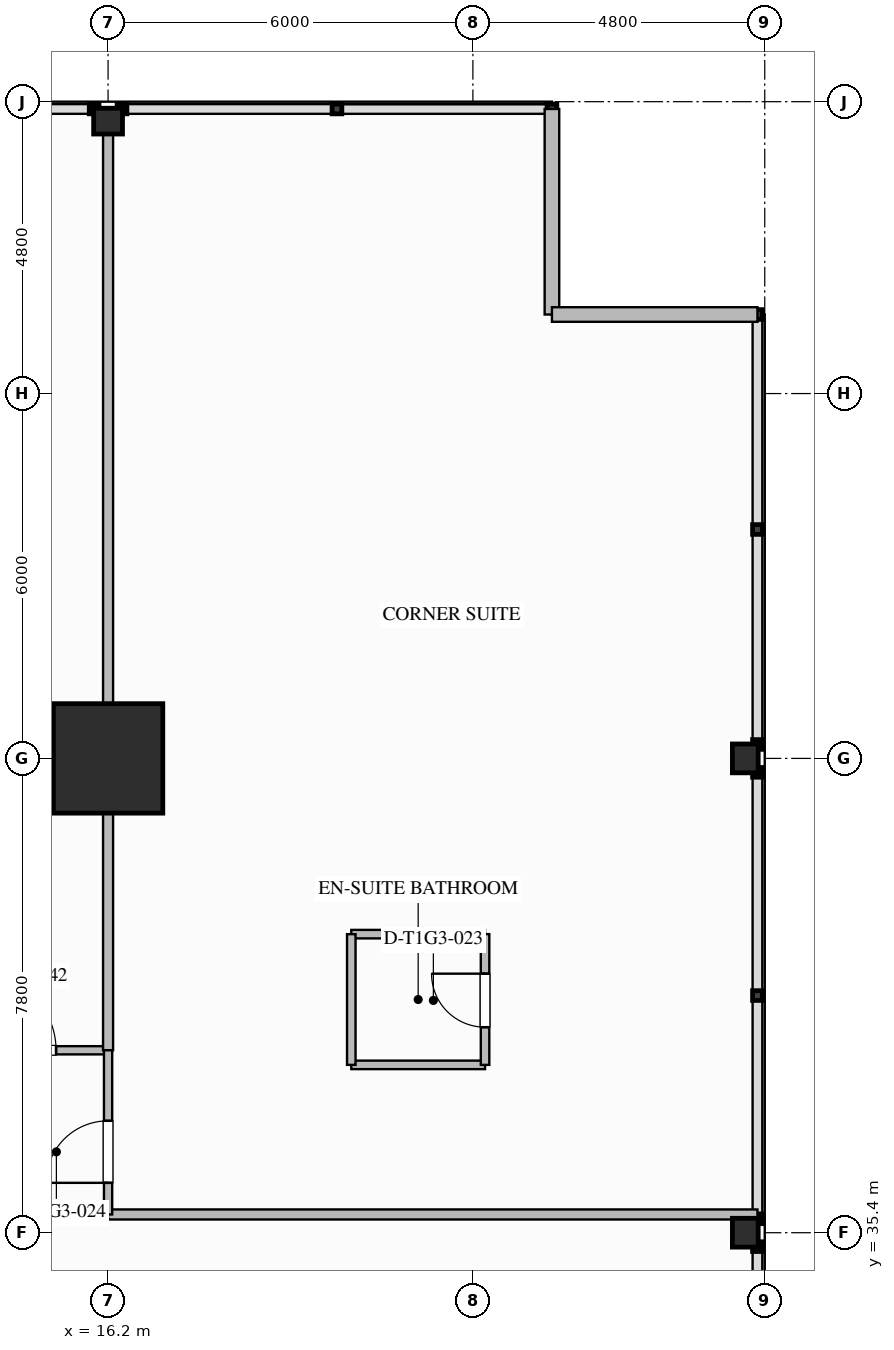
"""IFC4 building model, lengths in metres.
Left out: names, types, materials, properties, quantities, classifications, styles, units other than length and angle.
Written with IfcOpenShell. Run it as: python <this file> out.ifc"""

import sys

from ifc_helpers import new_model, si_unit, direction, frame, frame_2d, origin, origin_2d, place, context, subcontext, project, spatial, rectangle, i_section, extrude, element, fill, save


model = new_model("IFC4")
c1 = context("Model", 3, precision=1e-05, world=origin(), true_north=direction((0.0, 1.0)))
c2 = subcontext(c1, "Body", "Model", "MODEL_VIEW")
j1 = project(units=[si_unit("LENGTHUNIT", "METRE"), si_unit("PLANEANGLEUNIT", "RADIAN")], contexts=[c1])
p1 = place(None, origin())
s1 = spatial("IfcSite", under=j1, at=p1, CompositionType="ELEMENT")
p2 = place(p1, origin())
s2 = spatial("IfcBuilding", under=s1, at=p2, CompositionType="ELEMENT")
p3 = place(p2, frame((0.0, 0.0, 61.2)))
s3 = spatial("IfcBuildingStorey", under=s2, at=p3, CompositionType="ELEMENT", Elevation=61.2)
p4 = place(p3, frame((16.2, 43.2, 0.0), z_axis=(0.0, 0.0, 1.0), x_axis=(1.0, 0.0, 0.0)))
e1 = element("IfcColumn", 1, at=p4, inside=s3, PredefinedType="COLUMN", context=c2, shape_type="SweptSolid", body=[
    extrude(rectangle(XDim=1.8, YDim=1.8, at=origin_2d()), origin(), (0.0, 0.0, 1.0), 3.5),
])
for number, where, z_axis, x_axis in (
    (2, (26.68, 35.4, 0.0), (0.0, 0.0, 1.0), (1.0, 0.0, 0.0)),
    (3, (26.68, 43.2, 0.0), (0.0, 0.0, 1.0), (1.0, 0.0, 0.0)),
    (4, (16.2, 53.68, 0.0), (0.0, 0.0, 1.0), (0.0, 1.0, 0.0)),
):
    element("IfcColumn", number, at=place(p3, frame(where, z_axis=z_axis, x_axis=x_axis)), inside=s3, PredefinedType="COLUMN", context=c2, shape_type="SweptSolid", body=[
        extrude(i_section(OverallWidth=0.424, OverallDepth=0.474, WebThickness=0.048, FlangeThickness=0.077, FilletRadius=0.03, at=origin_2d()), origin(), (0.0, 0.0, 1.0), 3.497),
    ])
for number, where, z_axis, x_axis in (
    (5, (23.5, 53.88, 0.0), (0.0, 0.0, 1.0), (0.0, -1.0, 0.0)),
    (6, (23.5, 50.5, 0.0), (0.0, 0.0, 1.0), (1.0, 0.0, 0.0)),
):
    element("IfcWall", number, at=place(p3, frame(where, z_axis=z_axis, x_axis=x_axis)), inside=s3, PredefinedType="STANDARD", context=c2, shape_type="SweptSolid", body=[
        extrude(rectangle(XDim=3.38, YDim=0.24, at=frame_2d((1.69, 0.0))), origin(), (0.0, 0.0, 1.0), 3.24),
    ])
p5 = place(p3, frame((-16.2, 38.4, 0.0), z_axis=(0.0, 0.0, 1.0), x_axis=(1.0, 0.0, 0.0)))
e7 = element("IfcWall", 7, at=p5, inside=s3, PredefinedType="PARTITIONING", context=c2, shape_type="SweptSolid", body=[
    extrude(rectangle(XDim=32.4, YDim=0.135, at=frame_2d((16.2, 0.0))), origin(), (0.0, 0.0, 1.0), 3.24),
])
p6 = place(p5, frame((4.095, 0.0, 0.0)))
e8 = element("IfcOpeningElement", 8, at=p6, cuts=e7, PredefinedType="OPENING", context=c2, shape_type="SweptSolid", body=[
    extrude(rectangle(XDim=1.26, YDim=2.2, at=frame_2d((0.63, 1.1))), frame((0.0, 0.077, 0.0), z_axis=(0.0, -1.0, 0.0), x_axis=(1.0, 0.0, 0.0)), (0.0, 0.0, 1.0), 0.155),
])
p7 = place(p5, frame((7.875, 0.0, 0.0)))
e9 = element("IfcOpeningElement", 9, at=p7, cuts=e7, PredefinedType="OPENING", context=c2, shape_type="SweptSolid", body=[
    extrude(rectangle(XDim=1.26, YDim=2.2, at=frame_2d((0.63, 1.1))), frame((0.0, 0.077, 0.0), z_axis=(0.0, -1.0, 0.0), x_axis=(1.0, 0.0, 0.0)), (0.0, 0.0, 1.0), 0.155),
])
p8 = place(p5, frame((15.69, 0.0, 0.0)))
e10 = element("IfcOpeningElement", 10, at=p8, cuts=e7, PredefinedType="OPENING", context=c2, shape_type="SweptSolid", body=[
    extrude(rectangle(XDim=1.02, YDim=2.15, at=frame_2d((0.51, 1.075))), frame((0.0, 0.077, 0.0), z_axis=(0.0, -1.0, 0.0), x_axis=(1.0, 0.0, 0.0)), (0.0, 0.0, 1.0), 0.155),
])
p9 = place(p5, frame((21.645, 0.0, 0.0)))
e11 = element("IfcOpeningElement", 11, at=p9, cuts=e7, PredefinedType="OPENING", context=c2, shape_type="SweptSolid", body=[
    extrude(rectangle(XDim=1.26, YDim=2.2, at=frame_2d((0.63, 1.1))), frame((0.0, 0.077, 0.0), z_axis=(0.0, -1.0, 0.0), x_axis=(1.0, 0.0, 0.0)), (0.0, 0.0, 1.0), 0.155),
])
p10 = place(p5, frame((30.285, 0.0, 0.0)))
e12 = element("IfcOpeningElement", 12, at=p10, cuts=e7, PredefinedType="OPENING", context=c2, shape_type="SweptSolid", body=[
    extrude(rectangle(XDim=1.26, YDim=2.2, at=frame_2d((0.63, 1.1))), frame((0.0, 0.077, 0.0), z_axis=(0.0, -1.0, 0.0), x_axis=(1.0, 0.0, 0.0)), (0.0, 0.0, 1.0), 0.155),
])
p11 = place(p3, frame((11.35, 35.7, 0.0), z_axis=(0.0, 0.0, 1.0), x_axis=(1.0, 0.0, 0.0)))
e13 = element("IfcWall", 13, at=p11, inside=s3, PredefinedType="PARTITIONING", context=c2, shape_type="SweptSolid", body=[
    extrude(rectangle(XDim=4.85, YDim=0.135, at=frame_2d((2.425, 0.0))), origin(), (0.0, 0.0, 1.0), 3.24),
])
p12 = place(p3, frame((16.2, 38.4, 0.0), z_axis=(0.0, 0.0, 1.0), x_axis=(0.0, 1.0, 0.0)))
e14 = element("IfcWall", 14, at=p12, inside=s3, PredefinedType="PARTITIONING", context=c2, shape_type="SweptSolid", body=[
    extrude(rectangle(XDim=15.48, YDim=0.165, at=frame_2d((7.74, 0.0))), origin(), (0.0, 0.0, 1.0), 2.452),
])
p13 = place(p3, frame((16.2, 35.7, 0.0), z_axis=(0.0, 0.0, 1.0), x_axis=(1.0, 0.0, 0.0)))
e15 = element("IfcWall", 15, at=p13, inside=s3, PredefinedType="PARTITIONING", context=c2, shape_type="SweptSolid", body=[
    extrude(rectangle(XDim=10.68, YDim=0.165, at=frame_2d((5.34, 0.0))), origin(), (0.0, 0.0, 1.0), 2.452),
])
p14 = place(p3, frame((16.2, 35.7, 0.0), z_axis=(0.0, 0.0, 1.0), x_axis=(0.0, 1.0, 0.0)))
e16 = element("IfcWall", 16, at=p14, inside=s3, PredefinedType="PARTITIONING", context=c2, shape_type="SweptSolid", body=[
    extrude(rectangle(XDim=2.7, YDim=0.135, at=frame_2d((1.35, 0.0))), origin(), (0.0, 0.0, 1.0), 2.452),
])
p15 = place(p14, frame((0.52, 0.0, 0.0)))
e17 = element("IfcOpeningElement", 17, at=p15, cuts=e16, PredefinedType="OPENING", context=c2, shape_type="SweptSolid", body=[
    extrude(rectangle(XDim=1.02, YDim=2.15, at=frame_2d((0.51, 1.075))), frame((0.0, 0.077, 0.0), z_axis=(0.0, -1.0, 0.0), x_axis=(1.0, 0.0, 0.0)), (0.0, 0.0, 1.0), 0.155),
])
for number, where, z_axis, x_axis in (
    (18, (20.2, 38.16, 0.0), (0.0, 0.0, 1.0), (1.0, 0.0, 0.0)),
    (19, (20.2, 40.31, 0.0), (0.0, 0.0, 1.0), (1.0, 0.0, 0.0)),
):
    element("IfcWall", number, at=place(p3, frame(where, z_axis=z_axis, x_axis=x_axis)), inside=s3, PredefinedType="PLUMBINGWALL", context=c2, shape_type="SweptSolid", body=[
        extrude(rectangle(XDim=2.2, YDim=0.14, at=frame_2d((1.1, 0.0))), origin(), (0.0, 0.0, 1.0), 3.24),
    ])
p16 = place(p3, frame((20.2, 38.16, 0.0), z_axis=(0.0, 0.0, 1.0), x_axis=(0.0, 1.0, 0.0)))
e20 = element("IfcWall", 20, at=p16, inside=s3, PredefinedType="PLUMBINGWALL", context=c2, shape_type="SweptSolid", body=[
    extrude(rectangle(XDim=2.15, YDim=0.14, at=frame_2d((1.075, 0.0))), origin(), (0.0, 0.0, 1.0), 3.24),
])
p17 = place(p3, frame((22.4, 38.16, 0.0), z_axis=(0.0, 0.0, 1.0), x_axis=(0.0, 1.0, 0.0)))
e21 = element("IfcWall", 21, at=p17, inside=s3, PredefinedType="PLUMBINGWALL", context=c2, shape_type="SweptSolid", body=[
    extrude(rectangle(XDim=2.15, YDim=0.14, at=frame_2d((1.075, 0.0))), origin(), (0.0, 0.0, 1.0), 3.24),
])
p18 = place(p17, frame((0.62, 0.0, 0.0)))
e22 = element("IfcOpeningElement", 22, at=p18, cuts=e21, PredefinedType="OPENING", context=c2, shape_type="SweptSolid", body=[
    extrude(rectangle(XDim=0.88, YDim=2.1, at=frame_2d((0.44, 1.05))), frame((0.0, 0.08, 0.0), z_axis=(0.0, -1.0, 0.0), x_axis=(1.0, 0.0, 0.0)), (0.0, 0.0, 1.0), 0.16),
])
p19 = place(p18, origin())
e23 = element("IfcDoor", 23, at=p19, inside=s3, OperationType="SINGLE_SWING_RIGHT", PredefinedType="DOOR", context=c2, shape_type="SweptSolid", body=[
    extrude(rectangle(XDim=0.88, YDim=2.1, at=frame_2d((0.44, 1.05))), frame((0.0, 0.025, 0.0), z_axis=(0.0, -1.0, 0.0), x_axis=(1.0, 0.0, 0.0)), (0.0, 0.0, 1.0), 0.05),
])
fill(e22, e23)
p20 = place(p15, origin())
e24 = element("IfcDoor", 24, at=p20, inside=s3, OperationType="SINGLE_SWING_LEFT", PredefinedType="DOOR", context=c2, shape_type="SweptSolid", body=[
    extrude(rectangle(XDim=1.02, YDim=2.15, at=frame_2d((0.51, 1.075))), frame((0.0, 0.025, 0.0), z_axis=(0.0, -1.0, 0.0), x_axis=(1.0, 0.0, 0.0)), (0.0, 0.0, 1.0), 0.05),
])
fill(e17, e24)
p21 = place(p10, origin())
e25 = element("IfcDoor", 25, at=p21, inside=s3, OperationType="SINGLE_SWING_LEFT", PredefinedType="DOOR", context=c2, shape_type="SweptSolid", body=[
    extrude(rectangle(XDim=1.26, YDim=2.2, at=frame_2d((0.63, 1.1))), frame((0.0, 0.025, 0.0), z_axis=(0.0, -1.0, 0.0), x_axis=(1.0, 0.0, 0.0)), (0.0, 0.0, 1.0), 0.05),
])
fill(e12, e25)
save(model, sys.argv[1])
